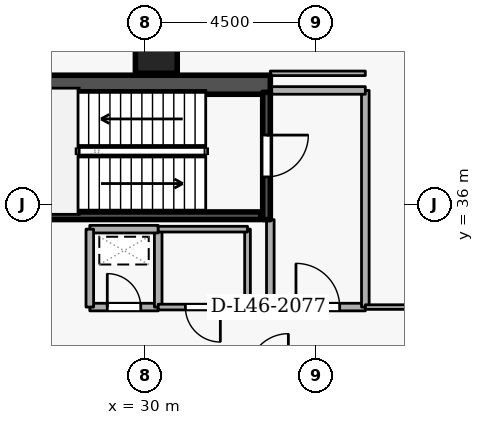
"""IFC4 building model, lengths in metres.
Left out: names, types, materials, properties, quantities, classifications, styles, units other than length and angle.
Written with IfcOpenShell. Run it as: python <this file> out.ifc"""

import sys

from ifc_helpers import new_model, si_unit, direction, frame, frame_2d, origin, origin_2d, place, context, subcontext, project, spatial, rectangle, extrude, element, fill, save


model = new_model("IFC4")
c1 = context("Model", 3, precision=1e-05, world=origin(), true_north=direction((0.0, 1.0)))
c2 = subcontext(c1, "Body", "Model", "MODEL_VIEW")
j1 = project(units=[si_unit("LENGTHUNIT", "METRE"), si_unit("PLANEANGLEUNIT", "RADIAN")], contexts=[c1])
p1 = place(None, origin())
s1 = spatial("IfcSite", under=j1, at=p1, CompositionType="ELEMENT")
p2 = place(p1, origin())
s2 = spatial("IfcBuilding", under=s1, at=p2, CompositionType="ELEMENT")
p3 = place(p2, frame((0.0, 0.0, 174.3)))
s3 = spatial("IfcBuildingStorey", under=s2, at=p3, CompositionType="ELEMENT", Elevation=174.3)
p4 = place(p3, frame((17.7, 39.15, 0.0), z_axis=(0.0, 0.0, 1.0), x_axis=(1.0, 0.0, 0.0)))
e1 = element("IfcWall", 1, at=p4, inside=s3, PredefinedType="SHEAR", context=c2, shape_type="SweptSolid", body=[
    extrude(rectangle(XDim=15.6, YDim=0.5, at=frame_2d((7.8, 0.0))), origin(), (0.0, 0.0, 1.0), 4.2),
])
p5 = place(p3, frame((30.3, 40.0, 0.0), z_axis=(0.0, 0.0, 1.0), x_axis=(1.0, 0.0, 0.0)))
e2 = element("IfcColumn", 2, at=p5, inside=s3, PredefinedType="COLUMN", context=c2, shape_type="SweptSolid", body=[
    extrude(rectangle(XDim=1.1, YDim=1.1, at=origin_2d()), origin(), (0.0, 0.0, 1.0), 4.2),
])
p6 = place(p3, frame((33.2, 38.95, 0.0), z_axis=(0.0, 0.0, 1.0), x_axis=(0.0, -1.0, 0.0)))
e3 = element("IfcWall", 3, at=p6, inside=s3, PredefinedType="SHEAR", context=c2, shape_type="SweptSolid", body=[
    extrude(rectangle(XDim=3.35, YDim=0.2, at=frame_2d((1.675, 0.0))), origin(), (0.0, 0.0, 1.0), 4.2),
])
p7 = place(p6, frame((1.125, 0.0, 0.0)))
e4 = element("IfcOpeningElement", 4, at=p7, cuts=e3, PredefinedType="OPENING", context=c2, shape_type="SweptSolid", body=[
    extrude(rectangle(XDim=1.1, YDim=2.1, at=frame_2d((0.55, 1.05))), frame((0.0, 0.11, 0.0), z_axis=(0.0, -1.0, 0.0), x_axis=(1.0, 0.0, 0.0)), (0.0, 0.0, 1.0), 0.22),
])
p8 = place(p3, frame((25.95, 35.703, 0.0), z_axis=(0.0, 0.0, 1.0), x_axis=(1.0, 0.0, 0.0)))
e5 = element("IfcWall", 5, at=p8, inside=s3, PredefinedType="SHEAR", context=c2, shape_type="SweptSolid", body=[
    extrude(rectangle(XDim=7.1, YDim=0.2, at=frame_2d((3.55, 0.0))), origin(), (0.0, 0.0, 1.0), 4.2),
])
p9 = place(p3, frame((33.3, 33.3, 0.0), z_axis=(0.0, 0.0, 1.0), x_axis=(1.0, 0.0, 0.0)))
e6 = element("IfcWall", 6, at=p9, inside=s3, PredefinedType="STANDARD", context=c2, shape_type="SweptSolid", body=[
    extrude(rectangle(XDim=2.5, YDim=0.2, at=frame_2d((1.25, 0.0))), origin(), (0.0, 0.0, 1.0), 3.94),
])
p10 = place(p9, frame((0.675, 0.0, 0.0)))
e7 = element("IfcOpeningElement", 7, at=p10, cuts=e6, PredefinedType="OPENING", context=c2, shape_type="SweptSolid", body=[
    extrude(rectangle(XDim=1.15, YDim=2.1, at=frame_2d((0.575, 1.05))), frame((0.0, 0.11, 0.0), z_axis=(0.0, -1.0, 0.0), x_axis=(1.0, 0.0, 0.0)), (0.0, 0.0, 1.0), 0.22),
])
p11 = place(p3, frame((35.8, 33.3, 0.0), z_axis=(0.0, 0.0, 1.0), x_axis=(0.0, 1.0, 0.0)))
e8 = element("IfcWall", 8, at=p11, inside=s3, PredefinedType="STANDARD", context=c2, shape_type="SweptSolid", body=[
    extrude(rectangle(XDim=5.7, YDim=0.2, at=frame_2d((2.85, 0.0))), origin(), (0.0, 0.0, 1.0), 3.94),
])
p12 = place(p3, frame((35.8, 39.0, 0.0), z_axis=(0.0, 0.0, 1.0), x_axis=(-1.0, 0.0, 0.0)))
e9 = element("IfcWall", 9, at=p12, inside=s3, PredefinedType="STANDARD", context=c2, shape_type="SweptSolid", body=[
    extrude(rectangle(XDim=2.5, YDim=0.2, at=frame_2d((1.25, 0.0))), origin(), (0.0, 0.0, 1.0), 3.94),
])
p13 = place(p3, frame((33.3, 35.6, 0.0), z_axis=(0.0, 0.0, 1.0), x_axis=(0.0, -1.0, 0.0)))
e10 = element("IfcWall", 10, at=p13, inside=s3, PredefinedType="STANDARD", context=c2, shape_type="SweptSolid", body=[
    extrude(rectangle(XDim=2.3, YDim=0.2, at=frame_2d((1.15, 0.0))), origin(), (0.0, 0.0, 1.0), 3.145),
])
p14 = place(p3, frame((28.55, 33.3, 0.0), z_axis=(0.0, 0.0, 1.0), x_axis=(1.0, 0.0, 0.0)))
e11 = element("IfcWall", 11, at=p14, inside=s3, PredefinedType="STANDARD", context=c2, shape_type="SweptSolid", body=[
    extrude(rectangle(XDim=1.8, YDim=0.2, at=frame_2d((0.9, 0.0))), origin(), (0.0, 0.0, 1.0), 3.94),
])
p15 = place(p14, frame((0.46, 0.0, 0.0)))
e12 = element("IfcOpeningElement", 12, at=p15, cuts=e11, PredefinedType="OPENING", context=c2, shape_type="SweptSolid", body=[
    extrude(rectangle(XDim=0.88, YDim=2.04, at=frame_2d((0.44, 1.02))), frame((0.0, 0.11, 0.0), z_axis=(0.0, -1.0, 0.0), x_axis=(1.0, 0.0, 0.0)), (0.0, 0.0, 1.0), 0.22),
])
p16 = place(p3, frame((30.35, 33.3, 0.0), z_axis=(0.0, 0.0, 1.0), x_axis=(0.0, 1.0, 0.0)))
e13 = element("IfcWall", 13, at=p16, inside=s3, PredefinedType="STANDARD", context=c2, shape_type="SweptSolid", body=[
    extrude(rectangle(XDim=2.05, YDim=0.2, at=frame_2d((1.025, 0.0))), origin(), (0.0, 0.0, 1.0), 3.94),
])
p17 = place(p3, frame((30.35, 35.35, 0.0), z_axis=(0.0, 0.0, 1.0), x_axis=(-1.0, 0.0, 0.0)))
e14 = element("IfcWall", 14, at=p17, inside=s3, PredefinedType="STANDARD", context=c2, shape_type="SweptSolid", body=[
    extrude(rectangle(XDim=1.8, YDim=0.2, at=frame_2d((0.9, 0.0))), origin(), (0.0, 0.0, 1.0), 3.94),
])
p18 = place(p3, frame((28.55, 35.35, 0.0), z_axis=(0.0, 0.0, 1.0), x_axis=(0.0, -1.0, 0.0)))
e15 = element("IfcWall", 15, at=p18, inside=s3, PredefinedType="STANDARD", context=c2, shape_type="SweptSolid", body=[
    extrude(rectangle(XDim=2.05, YDim=0.2, at=frame_2d((1.025, 0.0))), origin(), (0.0, 0.0, 1.0), 3.94),
])
p19 = place(p3, frame((32.7, 35.35, 0.0), z_axis=(0.0, 0.0, 1.0), x_axis=(0.0, -1.0, 0.0)))
e16 = element("IfcWall", 16, at=p19, inside=s3, PredefinedType="PARTITIONING", context=c2, shape_type="SweptSolid", body=[
    extrude(rectangle(XDim=2.05, YDim=0.15, at=frame_2d((1.025, 0.0))), origin(), (0.0, 0.0, 1.0), 3.145),
])
p20 = place(p3, frame((32.7, 33.3, 0.0), z_axis=(0.0, 0.0, 1.0), x_axis=(-1.0, 0.0, 0.0)))
e17 = element("IfcWall", 17, at=p20, inside=s3, PredefinedType="PARTITIONING", context=c2, shape_type="SweptSolid", body=[
    extrude(rectangle(XDim=2.35, YDim=0.15, at=frame_2d((1.175, 0.0))), origin(), (0.0, 0.0, 1.0), 3.94),
])
p21 = place(p20, frame((0.715, 0.0, 0.0)))
e18 = element("IfcOpeningElement", 18, at=p21, cuts=e17, PredefinedType="OPENING", context=c2, shape_type="SweptSolid", body=[
    extrude(rectangle(XDim=0.92, YDim=2.08, at=frame_2d((0.46, 1.04))), frame((0.0, 0.085, 0.0), z_axis=(0.0, -1.0, 0.0), x_axis=(1.0, 0.0, 0.0)), (0.0, 0.0, 1.0), 0.17),
])
p22 = place(p3, frame((30.35, 35.35, 0.0), z_axis=(0.0, 0.0, 1.0), x_axis=(1.0, 0.0, 0.0)))
e19 = element("IfcWall", 19, at=p22, inside=s3, PredefinedType="PARTITIONING", context=c2, shape_type="SweptSolid", body=[
    extrude(rectangle(XDim=2.35, YDim=0.15, at=frame_2d((1.175, 0.0))), origin(), (0.0, 0.0, 1.0), 3.94),
])
p23 = place(p3, frame((37.75, 33.3, 0.0), z_axis=(0.0, 0.0, 1.0), x_axis=(-1.0, 0.0, 0.0)))
e20 = element("IfcWall", 20, at=p23, inside=s3, PredefinedType="PARTITIONING", context=c2, shape_type="SweptSolid", body=[
    extrude(rectangle(XDim=1.95, YDim=0.12, at=frame_2d((0.975, 0.0))), origin(), (0.0, 0.0, 1.0), 3.94),
])
p24 = place(p3, frame((35.8, 39.45, 0.0), z_axis=(0.0, 0.0, 1.0), x_axis=(-1.0, 0.0, 0.0)))
e21 = element("IfcWall", 21, at=p24, inside=s3, PredefinedType="PARTITIONING", context=c2, shape_type="SweptSolid", body=[
    extrude(rectangle(XDim=2.5, YDim=0.12, at=frame_2d((1.25, 0.0))), origin(), (0.0, 0.0, 1.0), 3.94),
])
p25 = place(p7, origin())
e22 = element("IfcDoor", 22, at=p25, inside=s3, OperationType="SINGLE_SWING_LEFT", PredefinedType="DOOR", context=c2, shape_type="SweptSolid", body=[
    extrude(rectangle(XDim=1.1, YDim=2.1, at=frame_2d((0.55, 1.05))), frame((0.0, 0.025, 0.0), z_axis=(0.0, -1.0, 0.0), x_axis=(1.0, 0.0, 0.0)), (0.0, 0.0, 1.0), 0.05),
])
fill(e4, e22)
p26 = place(p10, origin())
e23 = element("IfcDoor", 23, at=p26, inside=s3, OperationType="SINGLE_SWING_LEFT", PredefinedType="DOOR", context=c2, shape_type="SweptSolid", body=[
    extrude(rectangle(XDim=1.15, YDim=2.1, at=frame_2d((0.575, 1.05))), frame((0.0, 0.025, 0.0), z_axis=(0.0, -1.0, 0.0), x_axis=(1.0, 0.0, 0.0)), (0.0, 0.0, 1.0), 0.05),
])
fill(e7, e23)
p27 = place(p15, origin())
e24 = element("IfcDoor", 24, at=p27, inside=s3, OperationType="SINGLE_SWING_LEFT", PredefinedType="DOOR", context=c2, shape_type="SweptSolid", body=[
    extrude(rectangle(XDim=0.88, YDim=2.04, at=frame_2d((0.44, 1.02))), frame((0.0, 0.025, 0.0), z_axis=(0.0, -1.0, 0.0), x_axis=(1.0, 0.0, 0.0)), (0.0, 0.0, 1.0), 0.05),
])
fill(e12, e24)
p28 = place(p21, origin())
e25 = element("IfcDoor", 25, at=p28, inside=s3, OperationType="SINGLE_SWING_LEFT", PredefinedType="DOOR", context=c2, shape_type="SweptSolid", body=[
    extrude(rectangle(XDim=0.92, YDim=2.08, at=frame_2d((0.46, 1.04))), frame((0.0, 0.025, 0.0), z_axis=(0.0, -1.0, 0.0), x_axis=(1.0, 0.0, 0.0)), (0.0, 0.0, 1.0), 0.05),
])
fill(e18, e25)
save(model, sys.argv[1])
